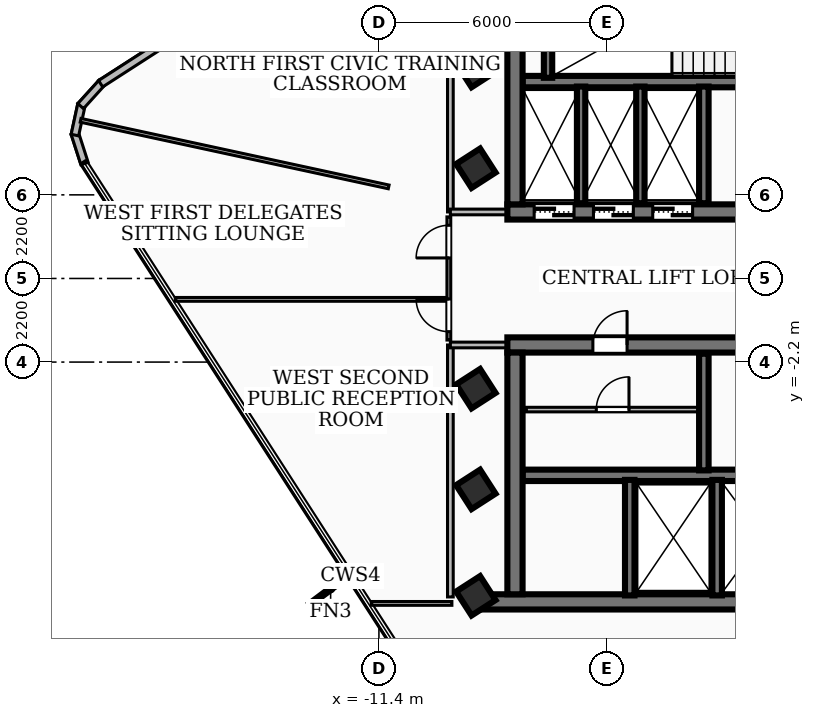
"""IFC4 building model, lengths in metres.
Left out: names, types, materials, properties, quantities, classifications, styles, units other than length and angle.
Written with IfcOpenShell. Run it as: python <this file> out.ifc"""

import sys

from ifc_helpers import new_model, si_unit, direction, frame, frame_2d, origin, origin_2d, place, context, subcontext, project, spatial, rectangle, extrude, element, fill, save


model = new_model("IFC4")
c1 = context("Model", 3, precision=1e-05, world=origin(), true_north=direction((0.0, 1.0)))
c2 = subcontext(c1, "Body", "Model", "MODEL_VIEW")
j1 = project(units=[si_unit("LENGTHUNIT", "METRE"), si_unit("PLANEANGLEUNIT", "RADIAN")], contexts=[c1])
p1 = place(None, origin())
s1 = spatial("IfcSite", under=j1, at=p1, CompositionType="ELEMENT")
p2 = place(p1, origin())
s2 = spatial("IfcBuilding", under=s1, at=p2, CompositionType="ELEMENT")
p3 = place(p2, frame((0.0, 0.0, 215.46)))
s3 = spatial("IfcBuildingStorey", under=s2, at=p3, CompositionType="ELEMENT", Elevation=215.46)
p4 = place(p3, frame((8.02, 1.75, 0.0), z_axis=(0.0, 0.0, 1.0), x_axis=(-1.0, 0.0, 0.0)))
e1 = element("IfcWall", 1, at=p4, inside=s3, PredefinedType="SHEAR", context=c2, shape_type="SweptSolid", body=[
    extrude(rectangle(XDim=16.04, YDim=0.4, at=frame_2d((8.02, 0.0))), origin(), (0.0, 0.0, 1.0), 3.16),
])
p5 = place(p4, frame((7.45, 0.0, 0.0)))
e2 = element("IfcOpeningElement", 2, at=p5, cuts=e1, PredefinedType="OPENING", context=c2, shape_type="SweptSolid", body=[
    extrude(rectangle(XDim=1.0, YDim=2.1, at=frame_2d((0.5, 1.05))), frame((0.0, 0.21, 0.0), z_axis=(0.0, -1.0, 0.0), x_axis=(1.0, 0.0, 0.0)), (0.0, 0.0, 1.0), 0.42),
])
p6 = place(p4, frame((14.285, 0.0, 0.0)))
e3 = element("IfcOpeningElement", 3, at=p6, cuts=e1, PredefinedType="OPENING", context=c2, shape_type="SweptSolid", body=[
    extrude(rectangle(XDim=1.05, YDim=2.15, at=frame_2d((0.525, 1.075))), frame((0.0, 0.21, 0.0), z_axis=(0.0, -1.0, 0.0), x_axis=(1.0, 0.0, 0.0)), (0.0, 0.0, 1.0), 0.42),
])
p7 = place(p4, frame((12.725, 0.0, 0.0)))
e4 = element("IfcOpeningElement", 4, at=p7, cuts=e1, PredefinedType="OPENING", context=c2, shape_type="SweptSolid", body=[
    extrude(rectangle(XDim=1.05, YDim=2.15, at=frame_2d((0.525, 1.075))), frame((0.0, 0.21, 0.0), z_axis=(0.0, -1.0, 0.0), x_axis=(1.0, 0.0, 0.0)), (0.0, 0.0, 1.0), 0.42),
])
p8 = place(p4, frame((11.165, 0.0, 0.0)))
e5 = element("IfcOpeningElement", 5, at=p8, cuts=e1, PredefinedType="OPENING", context=c2, shape_type="SweptSolid", body=[
    extrude(rectangle(XDim=1.05, YDim=2.15, at=frame_2d((0.525, 1.075))), frame((0.0, 0.21, 0.0), z_axis=(0.0, -1.0, 0.0), x_axis=(1.0, 0.0, 0.0)), (0.0, 0.0, 1.0), 0.42),
])
p9 = place(p4, frame((3.85, 0.0, 0.0)))
e6 = element("IfcOpeningElement", 6, at=p9, cuts=e1, PredefinedType="OPENING", context=c2, shape_type="SweptSolid", body=[
    extrude(rectangle(XDim=0.9, YDim=2.06, at=frame_2d((0.45, 1.03))), frame((0.0, 0.21, 0.0), z_axis=(0.0, -1.0, 0.0), x_axis=(1.0, 0.0, 0.0)), (0.0, 0.0, 1.0), 0.42),
])
p10 = place(p4, frame((2.35, 0.0, 0.0)))
e7 = element("IfcOpeningElement", 7, at=p10, cuts=e1, PredefinedType="OPENING", context=c2, shape_type="SweptSolid", body=[
    extrude(rectangle(XDim=0.9, YDim=2.06, at=frame_2d((0.45, 1.03))), frame((0.0, 0.21, 0.0), z_axis=(0.0, -1.0, 0.0), x_axis=(1.0, 0.0, 0.0)), (0.0, 0.0, 1.0), 0.42),
])
p11 = place(p4, frame((0.8, 0.0, 0.0)))
e8 = element("IfcOpeningElement", 8, at=p11, cuts=e1, PredefinedType="OPENING", context=c2, shape_type="SweptSolid", body=[
    extrude(rectangle(XDim=0.9, YDim=2.06, at=frame_2d((0.45, 1.03))), frame((0.0, 0.21, 0.0), z_axis=(0.0, -1.0, 0.0), x_axis=(1.0, 0.0, 0.0)), (0.0, 0.0, 1.0), 0.42),
])
p12 = place(p3, frame((-7.82, 1.95, 0.0), z_axis=(0.0, 0.0, 1.0), x_axis=(0.0, 1.0, 0.0)))
e9 = element("IfcWall", 9, at=p12, inside=s3, PredefinedType="SHEAR", context=c2, shape_type="SweptSolid", body=[
    extrude(rectangle(XDim=6.36, YDim=0.4, at=frame_2d((3.18, 0.0))), origin(), (0.0, 0.0, 1.0), 3.16),
])
p13 = place(p3, frame((7.62, 5.18, 0.0), z_axis=(0.0, 0.0, 1.0), x_axis=(-1.0, 0.0, 0.0)))
e10 = element("IfcWall", 10, at=p13, inside=s3, PredefinedType="SOLIDWALL", context=c2, shape_type="SweptSolid", body=[
    extrude(rectangle(XDim=15.24, YDim=0.3, at=frame_2d((7.62, 0.0))), origin(), (0.0, 0.0, 1.0), 3.16),
])
p14 = place(p13, frame((5.77, 0.0, 0.0)))
e11 = element("IfcOpeningElement", 11, at=p14, cuts=e10, PredefinedType="OPENING", context=c2, shape_type="SweptSolid", body=[
    extrude(rectangle(XDim=1.1, YDim=2.15, at=frame_2d((0.55, 1.075))), frame((0.0, 0.16, 0.0), z_axis=(0.0, -1.0, 0.0), x_axis=(1.0, 0.0, 0.0)), (0.0, 0.0, 1.0), 0.32),
])
p15 = place(p13, frame((2.97, 0.0, 0.0)))
e12 = element("IfcOpeningElement", 12, at=p15, cuts=e10, PredefinedType="OPENING", context=c2, shape_type="SweptSolid", body=[
    extrude(rectangle(XDim=1.1, YDim=2.15, at=frame_2d((0.55, 1.075))), frame((0.0, 0.16, 0.0), z_axis=(0.0, -1.0, 0.0), x_axis=(1.0, 0.0, 0.0)), (0.0, 0.0, 1.0), 0.32),
])
p16 = place(p13, frame((7.97, 0.0, 0.0)))
e13 = element("IfcOpeningElement", 13, at=p16, cuts=e10, PredefinedType="OPENING", context=c2, shape_type="SweptSolid", body=[
    extrude(rectangle(XDim=1.0, YDim=2.1, at=frame_2d((0.5, 1.05))), frame((0.0, 0.16, 0.0), z_axis=(0.0, -1.0, 0.0), x_axis=(1.0, 0.0, 0.0)), (0.0, 0.0, 1.0), 0.32),
])
p17 = place(p3, frame((8.78, -8.51, 0.0), z_axis=(0.0, 0.0, 1.0), x_axis=(-1.0, 0.0, 0.0)))
e14 = element("IfcWall", 14, at=p17, inside=s3, PredefinedType="SHEAR", context=c2, shape_type="SweptSolid", body=[
    extrude(rectangle(XDim=17.56, YDim=0.4, at=frame_2d((8.78, 0.0))), origin(), (0.0, 0.0, 1.0), 3.16),
])
p18 = place(p3, frame((-8.02, -1.75, 0.0), z_axis=(0.0, 0.0, 1.0), x_axis=(1.0, 0.0, 0.0)))
e15 = element("IfcWall", 15, at=p18, inside=s3, PredefinedType="SHEAR", context=c2, shape_type="SweptSolid", body=[
    extrude(rectangle(XDim=16.04, YDim=0.4, at=frame_2d((8.02, 0.0))), origin(), (0.0, 0.0, 1.0), 3.16),
])
p19 = place(p18, frame((7.45, 0.0, 0.0)))
e16 = element("IfcOpeningElement", 16, at=p19, cuts=e15, PredefinedType="OPENING", context=c2, shape_type="SweptSolid", body=[
    extrude(rectangle(XDim=1.0, YDim=2.1, at=frame_2d((0.5, 1.05))), frame((0.0, 0.21, 0.0), z_axis=(0.0, -1.0, 0.0), x_axis=(1.0, 0.0, 0.0)), (0.0, 0.0, 1.0), 0.42),
])
p20 = place(p18, frame((12.65, 0.0, 0.0)))
e17 = element("IfcOpeningElement", 17, at=p20, cuts=e15, PredefinedType="OPENING", context=c2, shape_type="SweptSolid", body=[
    extrude(rectangle(XDim=0.9, YDim=2.06, at=frame_2d((0.45, 1.03))), frame((0.0, 0.21, 0.0), z_axis=(0.0, -1.0, 0.0), x_axis=(1.0, 0.0, 0.0)), (0.0, 0.0, 1.0), 0.42),
])
p21 = place(p18, frame((2.25, 0.0, 0.0)))
e18 = element("IfcOpeningElement", 18, at=p21, cuts=e15, PredefinedType="OPENING", context=c2, shape_type="SweptSolid", body=[
    extrude(rectangle(XDim=0.9, YDim=2.06, at=frame_2d((0.45, 1.03))), frame((0.0, 0.21, 0.0), z_axis=(0.0, -1.0, 0.0), x_axis=(1.0, 0.0, 0.0)), (0.0, 0.0, 1.0), 0.42),
])
p22 = place(p3, frame((-7.82, -8.31, 0.0), z_axis=(0.0, 0.0, 1.0), x_axis=(0.0, 1.0, 0.0)))
e19 = element("IfcWall", 19, at=p22, inside=s3, PredefinedType="SHEAR", context=c2, shape_type="SweptSolid", body=[
    extrude(rectangle(XDim=6.36, YDim=0.4, at=frame_2d((3.18, 0.0))), origin(), (0.0, 0.0, 1.0), 3.16),
])
p23 = place(p3, frame((-7.62, -5.18, 0.0), z_axis=(0.0, 0.0, 1.0), x_axis=(1.0, 0.0, 0.0)))
e20 = element("IfcWall", 20, at=p23, inside=s3, PredefinedType="SOLIDWALL", context=c2, shape_type="SweptSolid", body=[
    extrude(rectangle(XDim=15.24, YDim=0.3, at=frame_2d((7.62, 0.0))), origin(), (0.0, 0.0, 1.0), 3.16),
])
p24 = place(p23, frame((5.77, 0.0, 0.0)))
e21 = element("IfcOpeningElement", 21, at=p24, cuts=e20, PredefinedType="OPENING", context=c2, shape_type="SweptSolid", body=[
    extrude(rectangle(XDim=1.1, YDim=2.15, at=frame_2d((0.55, 1.075))), frame((0.0, 0.16, 0.0), z_axis=(0.0, -1.0, 0.0), x_axis=(1.0, 0.0, 0.0)), (0.0, 0.0, 1.0), 0.32),
])
p25 = place(p23, frame((7.97, 0.0, 0.0)))
e22 = element("IfcOpeningElement", 22, at=p25, cuts=e20, PredefinedType="OPENING", context=c2, shape_type="SweptSolid", body=[
    extrude(rectangle(XDim=1.0, YDim=2.1, at=frame_2d((0.5, 1.05))), frame((0.0, 0.16, 0.0), z_axis=(0.0, -1.0, 0.0), x_axis=(1.0, 0.0, 0.0)), (0.0, 0.0, 1.0), 0.32),
])
p26 = place(p3, frame((-6.95, 5.28, 0.0), z_axis=(0.0, 0.0, 1.0), x_axis=(0.0, 1.0, 0.0)))
e23 = element("IfcWall", 23, at=p26, inside=s3, PredefinedType="SOLIDWALL", context=c2, shape_type="SweptSolid", body=[
    extrude(rectangle(XDim=3.06, YDim=0.22, at=frame_2d((1.53, 0.0))), origin(), (0.0, 0.0, 1.0), 3.16),
])
p27 = place(p3, frame((-2.85, 1.98, 0.0), z_axis=(0.0, 0.0, 1.0), x_axis=(0.0, 1.0, 0.0)))
e24 = element("IfcWall", 24, at=p27, inside=s3, PredefinedType="SOLIDWALL", context=c2, shape_type="SweptSolid", body=[
    extrude(rectangle(XDim=3.07, YDim=0.25, at=frame_2d((1.535, 0.0))), origin(), (0.0, 0.0, 1.0), 3.16),
])
for number, where, z_axis, x_axis in (
    (25, (-2.5, -8.34, 0.0), (0.0, 0.0, 1.0), (0.0, 1.0, 0.0)),
    (26, (-4.8, -8.34, 0.0), (0.0, 0.0, 1.0), (0.0, 1.0, 0.0)),
):
    element("IfcWall", number, at=place(p3, frame(where, z_axis=z_axis, x_axis=x_axis)), inside=s3, PredefinedType="SOLIDWALL", context=c2, shape_type="SweptSolid", body=[
        extrude(rectangle(XDim=3.04, YDim=0.25, at=frame_2d((1.52, 0.0))), origin(), (0.0, 0.0, 1.0), 3.16),
    ])
p28 = place(p3, frame((-2.85, -5.05, 0.0), z_axis=(0.0, 0.0, 1.0), x_axis=(0.0, 1.0, 0.0)))
e27 = element("IfcWall", 27, at=p28, inside=s3, PredefinedType="SOLIDWALL", context=c2, shape_type="SweptSolid", body=[
    extrude(rectangle(XDim=3.07, YDim=0.25, at=frame_2d((1.535, 0.0))), origin(), (0.0, 0.0, 1.0), 3.16),
])
for number, where, z_axis, x_axis in (
    (28, (-6.08, 1.98, 0.0), (0.0, 0.0, 1.0), (0.0, 1.0, 0.0)),
    (29, (-4.52, 1.98, 0.0), (0.0, 0.0, 1.0), (0.0, 1.0, 0.0)),
):
    element("IfcWall", number, at=place(p3, frame(where, z_axis=z_axis, x_axis=x_axis)), inside=s3, PredefinedType="SOLIDWALL", context=c2, shape_type="SweptSolid", body=[
        extrude(rectangle(XDim=3.07, YDim=0.22, at=frame_2d((1.535, 0.0))), origin(), (0.0, 0.0, 1.0), 3.16),
    ])
for number, where, z_axis, x_axis in (
    (30, (-8.85, -5.55, 0.0), (0.0, 0.0, 1.0), (0.841, 0.542, 0.0)),
    (31, (-8.85, -2.9, 0.0), (0.0, 0.0, 1.0), (0.841, 0.542, 0.0)),
    (32, (-8.85, 2.9, 0.0), (0.0, 0.0, 1.0), (0.841, 0.542, 0.0)),
    (33, (-8.85, 5.55, 0.0), (0.0, 0.0, 1.0), (0.841, 0.542, 0.0)),
    (34, (-8.85, -8.35, 0.0), (0.0, 0.0, 1.0), (0.841, 0.542, 0.0)),
):
    element("IfcColumn", number, at=place(p3, frame(where, z_axis=z_axis, x_axis=x_axis)), inside=s3, PredefinedType="COLUMN", context=c2, shape_type="SweptSolid", body=[
        extrude(rectangle(XDim=0.75, YDim=0.75, at=origin_2d()), origin(), (0.0, 0.0, 1.0), 3.42),
    ])
p29 = place(p3, frame((-19.146, 3.023, 0.0), z_axis=(0.0, 0.0, 1.0), x_axis=(-0.306602907463, 0.951837516142, 0.0)))
e35 = element("IfcWall", 35, at=p29, inside=s3, PredefinedType="SOLIDWALL", context=c2, shape_type="SweptSolid", body=[
    extrude(rectangle(XDim=0.838, YDim=0.2, at=frame_2d((0.419, 0.0))), origin(), (0.0, 0.0, 1.0), 3.16),
])
p30 = place(p3, frame((-19.4, 3.773, 0.0), z_axis=(0.0, 0.0, 1.0), x_axis=(0.211087829535, 0.977467098281, 0.0)))
e36 = element("IfcWall", 36, at=p30, inside=s3, PredefinedType="SOLIDWALL", context=c2, shape_type="SweptSolid", body=[
    extrude(rectangle(XDim=0.823, YDim=0.2, at=frame_2d((0.412, 0.0))), origin(), (0.0, 0.0, 1.0), 3.16),
])
p31 = place(p3, frame((-19.248, 4.535, 0.0), z_axis=(0.0, 0.0, 1.0), x_axis=(0.671019988703, 0.741439258983, 0.0)))
e37 = element("IfcWall", 37, at=p31, inside=s3, PredefinedType="SOLIDWALL", context=c2, shape_type="SweptSolid", body=[
    extrude(rectangle(XDim=0.839, YDim=0.2, at=frame_2d((0.419, 0.0))), origin(), (0.0, 0.0, 1.0), 3.16),
])
p32 = place(p3, frame((-18.723, 5.124, 0.0), z_axis=(0.0, 0.0, 1.0), x_axis=(0.840584959151, 0.541679726821, 0.0)))
e38 = element("IfcWall", 38, at=p32, inside=s3, PredefinedType="SOLIDWALL", context=c2, shape_type="SweptSolid", body=[
    extrude(rectangle(XDim=6.742, YDim=0.2, at=frame_2d((3.371, 0.0))), origin(), (0.0, 0.0, 1.0), 3.16),
])
p33 = place(p3, frame((-7.52, -3.45, 0.0), z_axis=(0.0, 0.0, 1.0), x_axis=(1.0, 0.0, 0.0)))
e39 = element("IfcWall", 39, at=p33, inside=s3, PredefinedType="PARTITIONING", context=c2, shape_type="SweptSolid", body=[
    extrude(rectangle(XDim=4.54, YDim=0.12, at=frame_2d((2.27, 0.0))), origin(), (0.0, 0.0, 1.0), 3.16),
])
p34 = place(p33, frame((1.84, 0.0, 0.0)))
e40 = element("IfcOpeningElement", 40, at=p34, cuts=e39, PredefinedType="OPENING", context=c2, shape_type="SweptSolid", body=[
    extrude(rectangle(XDim=0.86, YDim=2.04, at=frame_2d((0.43, 1.02))), frame((0.0, 0.07, 0.0), z_axis=(0.0, -1.0, 0.0), x_axis=(1.0, 0.0, 0.0)), (0.0, 0.0, 1.0), 0.14),
])
p35 = place(p3, frame((-9.52, 1.75, 0.0), z_axis=(0.0, 0.0, 1.0), x_axis=(0.0, 1.0, 0.0)))
e41 = element("IfcWall", 41, at=p35, inside=s3, PredefinedType="PARTITIONING", context=c2, shape_type="SweptSolid", body=[
    extrude(rectangle(XDim=6.63, YDim=0.15, at=frame_2d((3.315, 0.0))), origin(), (0.0, 0.0, 1.0), 3.16),
])
p36 = place(p3, frame((-7.85, 1.75, 0.0), z_axis=(0.0, 0.0, 1.0), x_axis=(-1.0, 0.0, 0.0)))
e42 = element("IfcWall", 42, at=p36, inside=s3, PredefinedType="PARTITIONING", context=c2, shape_type="SweptSolid", body=[
    extrude(rectangle(XDim=1.67, YDim=0.15, at=frame_2d((0.835, 0.0))), origin(), (0.0, 0.0, 1.0), 2.39),
])
p37 = place(p3, frame((-9.52, -8.38, 0.0), z_axis=(0.0, 0.0, 1.0), x_axis=(0.0, 1.0, 0.0)))
e43 = element("IfcWall", 43, at=p37, inside=s3, PredefinedType="PARTITIONING", context=c2, shape_type="SweptSolid", body=[
    extrude(rectangle(XDim=6.63, YDim=0.15, at=frame_2d((3.315, 0.0))), origin(), (0.0, 0.0, 1.0), 3.16),
])
p38 = place(p3, frame((-7.85, -1.75, 0.0), z_axis=(0.0, 0.0, 1.0), x_axis=(-1.0, 0.0, 0.0)))
e44 = element("IfcWall", 44, at=p38, inside=s3, PredefinedType="PARTITIONING", context=c2, shape_type="SweptSolid", body=[
    extrude(rectangle(XDim=1.67, YDim=0.15, at=frame_2d((0.835, 0.0))), origin(), (0.0, 0.0, 1.0), 2.39),
])
p39 = place(p3, frame((-16.759, -0.55, 0.0), z_axis=(0.0, 0.0, 1.0), x_axis=(1.0, 0.0, 0.0)))
e45 = element("IfcWall", 45, at=p39, inside=s3, PredefinedType="PARTITIONING", context=c2, shape_type="SweptSolid", body=[
    extrude(rectangle(XDim=7.099, YDim=0.1, at=frame_2d((3.55, 0.0))), origin(), (0.0, 0.0, 1.0), 3.16),
])
p40 = place(p3, frame((-11.603, -8.55, 0.0), z_axis=(0.0, 0.0, 1.0), x_axis=(1.0, 0.0, 0.0)))
e46 = element("IfcWall", 46, at=p40, inside=s3, PredefinedType="PARTITIONING", context=c2, shape_type="SweptSolid", body=[
    extrude(rectangle(XDim=2.123, YDim=0.1, at=frame_2d((1.062, 0.0))), origin(), (0.0, 0.0, 1.0), 3.16),
])
p41 = place(p3, frame((-9.56, -1.62, 0.0), z_axis=(0.0, 0.0, 1.0), x_axis=(0.0, 1.0, 0.0)))
e47 = element("IfcWall", 47, at=p41, inside=s3, PredefinedType="PARTITIONING", context=c2, shape_type="SweptSolid", body=[
    extrude(rectangle(XDim=3.24, YDim=0.1, at=frame_2d((1.62, 0.0))), origin(), (0.0, 0.0, 1.0), 3.16),
])
p42 = place(p41, frame((0.22, 0.0, 0.0)))
e48 = element("IfcOpeningElement", 48, at=p42, cuts=e47, PredefinedType="OPENING", context=c2, shape_type="SweptSolid", body=[
    extrude(rectangle(XDim=0.86, YDim=2.04, at=frame_2d((0.43, 1.02))), frame((0.0, 0.06, 0.0), z_axis=(0.0, -1.0, 0.0), x_axis=(1.0, 0.0, 0.0)), (0.0, 0.0, 1.0), 0.12),
])
p43 = place(p41, frame((2.16, 0.0, 0.0)))
e49 = element("IfcOpeningElement", 49, at=p43, cuts=e47, PredefinedType="OPENING", context=c2, shape_type="SweptSolid", body=[
    extrude(rectangle(XDim=0.86, YDim=2.04, at=frame_2d((0.43, 1.02))), frame((0.0, 0.06, 0.0), z_axis=(0.0, -1.0, 0.0), x_axis=(1.0, 0.0, 0.0)), (0.0, 0.0, 1.0), 0.12),
])
p44 = place(p3, frame((-11.143, 2.409, 0.0), z_axis=(0.0, 0.0, 1.0), x_axis=(-0.977406112831, 0.211370032411, 0.0)))
e50 = element("IfcWall", 50, at=p44, inside=s3, PredefinedType="PARTITIONING", context=c2, shape_type="SweptSolid", body=[
    extrude(rectangle(XDim=8.294, YDim=0.1, at=frame_2d((4.147, 0.0))), origin(), (0.0, 0.0, 1.0), 3.16),
])
p45 = place(p6, origin())
e51 = element("IfcDoor", 51, at=p45, inside=s3, OperationType="DOUBLE_DOOR_SLIDING", PredefinedType="DOOR", context=c2, shape_type="SweptSolid", body=[
    extrude(rectangle(XDim=1.05, YDim=2.15, at=frame_2d((0.525, 1.075))), frame((0.0, 0.025, 0.0), z_axis=(0.0, -1.0, 0.0), x_axis=(1.0, 0.0, 0.0)), (0.0, 0.0, 1.0), 0.05),
])
fill(e3, e51)
p46 = place(p7, origin())
e52 = element("IfcDoor", 52, at=p46, inside=s3, OperationType="DOUBLE_DOOR_SLIDING", PredefinedType="DOOR", context=c2, shape_type="SweptSolid", body=[
    extrude(rectangle(XDim=1.05, YDim=2.15, at=frame_2d((0.525, 1.075))), frame((0.0, 0.025, 0.0), z_axis=(0.0, -1.0, 0.0), x_axis=(1.0, 0.0, 0.0)), (0.0, 0.0, 1.0), 0.05),
])
fill(e4, e52)
p47 = place(p8, origin())
e53 = element("IfcDoor", 53, at=p47, inside=s3, OperationType="DOUBLE_DOOR_SLIDING", PredefinedType="DOOR", context=c2, shape_type="SweptSolid", body=[
    extrude(rectangle(XDim=1.05, YDim=2.15, at=frame_2d((0.525, 1.075))), frame((0.0, 0.025, 0.0), z_axis=(0.0, -1.0, 0.0), x_axis=(1.0, 0.0, 0.0)), (0.0, 0.0, 1.0), 0.05),
])
fill(e5, e53)
p48 = place(p21, origin())
e54 = element("IfcDoor", 54, at=p48, inside=s3, OperationType="SINGLE_SWING_RIGHT", PredefinedType="DOOR", context=c2, shape_type="SweptSolid", body=[
    extrude(rectangle(XDim=0.9, YDim=2.06, at=frame_2d((0.45, 1.03))), frame((0.0, 0.025, 0.0), z_axis=(0.0, -1.0, 0.0), x_axis=(1.0, 0.0, 0.0)), (0.0, 0.0, 1.0), 0.05),
])
fill(e18, e54)
p49 = place(p34, origin())
e55 = element("IfcDoor", 55, at=p49, inside=s3, OperationType="SINGLE_SWING_RIGHT", PredefinedType="DOOR", context=c2, shape_type="SweptSolid", body=[
    extrude(rectangle(XDim=0.86, YDim=2.04, at=frame_2d((0.43, 1.02))), frame((0.0, 0.025, 0.0), z_axis=(0.0, -1.0, 0.0), x_axis=(1.0, 0.0, 0.0)), (0.0, 0.0, 1.0), 0.05),
])
fill(e40, e55)
p50 = place(p42, origin())
e56 = element("IfcDoor", 56, at=p50, inside=s3, OperationType="SINGLE_SWING_RIGHT", PredefinedType="DOOR", context=c2, shape_type="SweptSolid", body=[
    extrude(rectangle(XDim=0.86, YDim=2.04, at=frame_2d((0.43, 1.02))), frame((0.0, 0.025, 0.0), z_axis=(0.0, -1.0, 0.0), x_axis=(1.0, 0.0, 0.0)), (0.0, 0.0, 1.0), 0.05),
])
fill(e48, e56)
p51 = place(p43, origin())
e57 = element("IfcDoor", 57, at=p51, inside=s3, OperationType="SINGLE_SWING_LEFT", PredefinedType="DOOR", context=c2, shape_type="SweptSolid", body=[
    extrude(rectangle(XDim=0.86, YDim=2.04, at=frame_2d((0.43, 1.02))), frame((0.0, 0.025, 0.0), z_axis=(0.0, -1.0, 0.0), x_axis=(1.0, 0.0, 0.0)), (0.0, 0.0, 1.0), 0.05),
])
fill(e49, e57)
save(model, sys.argv[1])
